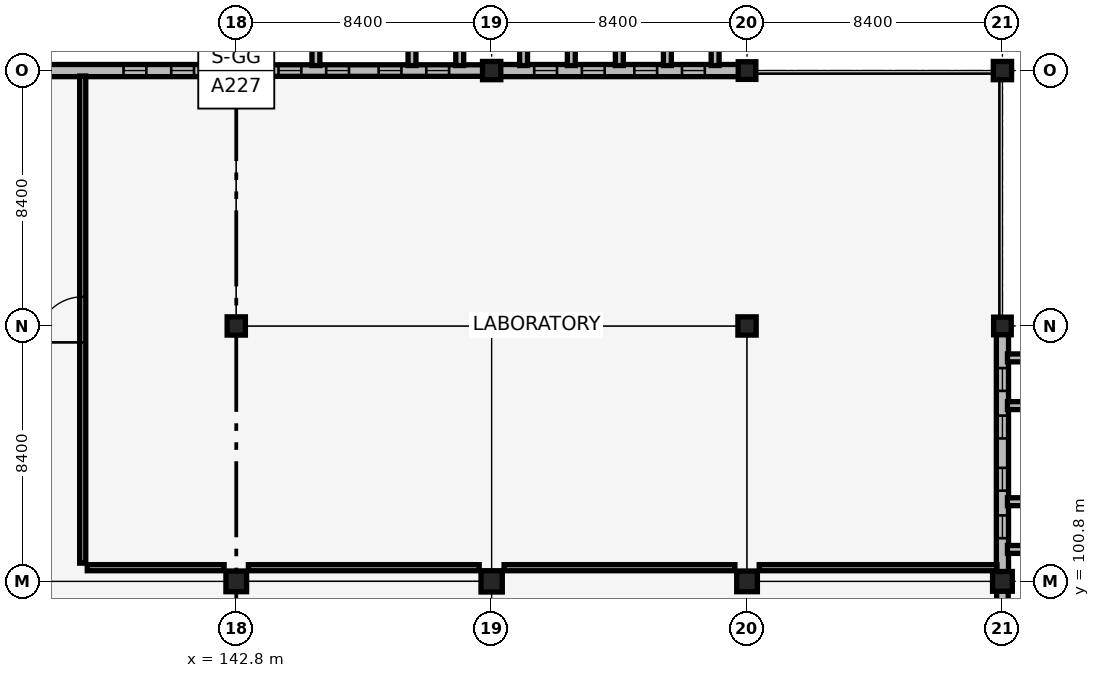
"""IFC4 building model, lengths in metres.
Left out: names, types, materials, properties, quantities, classifications, styles, units other than length and angle.
Written with IfcOpenShell. Run it as: python <this file> out.ifc"""

import sys

from ifc_helpers import new_model, si_unit, direction, frame, frame_2d, origin, origin_2d, place, context, subcontext, project, spatial, rectangle, extrude, element, fill, save


model = new_model("IFC4")
c1 = context("Model", 3, precision=1e-05, world=origin(), true_north=direction((0.0, 1.0)))
c2 = subcontext(c1, "Body", "Model", "MODEL_VIEW")
j1 = project(units=[si_unit("LENGTHUNIT", "METRE"), si_unit("PLANEANGLEUNIT", "RADIAN")], contexts=[c1])
p1 = place(None, origin())
s1 = spatial("IfcSite", under=j1, at=p1, CompositionType="ELEMENT")
p2 = place(p1, origin())
s2 = spatial("IfcBuilding", under=s1, at=p2, CompositionType="ELEMENT")
p3 = place(p2, frame((0.0, 0.0, 9.86)))
s3 = spatial("IfcBuildingStorey", under=s2, at=p3, CompositionType="ELEMENT", Elevation=9.86)
p4 = place(p3, frame((142.8, 100.8, 0.0), z_axis=(0.0, 0.0, 1.0), x_axis=(1.0, 0.0, 0.0)))
e1 = element("IfcColumn", 1, at=p4, inside=s3, PredefinedType="COLUMN", context=c2, shape_type="SweptSolid", body=[
    extrude(rectangle(XDim=0.68, YDim=0.68, at=origin_2d()), origin(), (0.0, 0.0, 1.0), 3.78),
])
p5 = place(p3, frame((142.8, 109.2, 0.0), z_axis=(0.0, 0.0, 1.0), x_axis=(1.0, 0.0, 0.0)))
e2 = element("IfcColumn", 2, at=p5, inside=s3, PredefinedType="COLUMN", context=c2, shape_type="SweptSolid", body=[
    extrude(rectangle(XDim=0.6, YDim=0.6, at=origin_2d()), origin(), (0.0, 0.0, 1.0), 3.78),
])
p6 = place(p3, frame((142.8, 117.6, 0.0), z_axis=(0.0, 0.0, 1.0), x_axis=(1.0, 0.0, 0.0)))
e3 = element("IfcColumn", 3, at=p6, inside=s3, PredefinedType="COLUMN", context=c2, shape_type="SweptSolid", body=[
    extrude(rectangle(XDim=0.58, YDim=0.58, at=origin_2d()), origin(), (0.0, 0.0, 1.0), 3.78),
])
p7 = place(p3, frame((151.2, 100.8, 0.0), z_axis=(0.0, 0.0, 1.0), x_axis=(1.0, 0.0, 0.0)))
e4 = element("IfcColumn", 4, at=p7, inside=s3, PredefinedType="COLUMN", context=c2, shape_type="SweptSolid", body=[
    extrude(rectangle(XDim=0.7, YDim=0.7, at=origin_2d()), origin(), (0.0, 0.0, 1.0), 3.78),
])
p8 = place(p3, frame((151.2, 109.2, 0.0), z_axis=(0.0, 0.0, 1.0), x_axis=(1.0, 0.0, 0.0)))
e5 = element("IfcColumn", 5, at=p8, inside=s3, PredefinedType="COLUMN", context=c2, shape_type="SweptSolid", body=[
    extrude(rectangle(XDim=0.58, YDim=0.58, at=origin_2d()), origin(), (0.0, 0.0, 1.0), 3.78),
])
p9 = place(p3, frame((151.2, 117.6, 0.0), z_axis=(0.0, 0.0, 1.0), x_axis=(1.0, 0.0, 0.0)))
e6 = element("IfcColumn", 6, at=p9, inside=s3, PredefinedType="COLUMN", context=c2, shape_type="SweptSolid", body=[
    extrude(rectangle(XDim=0.6, YDim=0.6, at=origin_2d()), origin(), (0.0, 0.0, 1.0), 3.78),
])
p10 = place(p3, frame((159.6, 100.8, 0.0), z_axis=(0.0, 0.0, 1.0), x_axis=(1.0, 0.0, 0.0)))
e7 = element("IfcColumn", 7, at=p10, inside=s3, PredefinedType="COLUMN", context=c2, shape_type="SweptSolid", body=[
    extrude(rectangle(XDim=0.68, YDim=0.68, at=origin_2d()), origin(), (0.0, 0.0, 1.0), 3.78),
])
p11 = place(p3, frame((159.6, 109.2, 0.0), z_axis=(0.0, 0.0, 1.0), x_axis=(1.0, 0.0, 0.0)))
e8 = element("IfcColumn", 8, at=p11, inside=s3, PredefinedType="COLUMN", context=c2, shape_type="SweptSolid", body=[
    extrude(rectangle(XDim=0.6, YDim=0.6, at=origin_2d()), origin(), (0.0, 0.0, 1.0), 3.78),
])
p12 = place(p3, frame((159.6, 117.6, 0.0), z_axis=(0.0, 0.0, 1.0), x_axis=(1.0, 0.0, 0.0)))
e9 = element("IfcColumn", 9, at=p12, inside=s3, PredefinedType="COLUMN", context=c2, shape_type="SweptSolid", body=[
    extrude(rectangle(XDim=0.58, YDim=0.58, at=origin_2d()), origin(), (0.0, 0.0, 1.0), 3.78),
])
p13 = place(p3, frame((168.0, 100.8, 0.0), z_axis=(0.0, 0.0, 1.0), x_axis=(1.0, 0.0, 0.0)))
e10 = element("IfcColumn", 10, at=p13, inside=s3, PredefinedType="COLUMN", context=c2, shape_type="SweptSolid", body=[
    extrude(rectangle(XDim=0.65, YDim=0.65, at=origin_2d()), origin(), (0.0, 0.0, 1.0), 3.78),
])
p14 = place(p3, frame((168.0, 109.2, 0.0), z_axis=(0.0, 0.0, 1.0), x_axis=(1.0, 0.0, 0.0)))
e11 = element("IfcColumn", 11, at=p14, inside=s3, PredefinedType="COLUMN", context=c2, shape_type="SweptSolid", body=[
    extrude(rectangle(XDim=0.58, YDim=0.58, at=origin_2d()), origin(), (0.0, 0.0, 1.0), 3.78),
])
p15 = place(p3, frame((168.0, 117.6, 0.0), z_axis=(0.0, 0.0, 1.0), x_axis=(1.0, 0.0, 0.0)))
e12 = element("IfcColumn", 12, at=p15, inside=s3, PredefinedType="COLUMN", context=c2, shape_type="SweptSolid", body=[
    extrude(rectangle(XDim=0.6, YDim=0.6, at=origin_2d()), origin(), (0.0, 0.0, 1.0), 3.78),
])
p16 = place(p3, frame((134.685, 117.6, 0.0), z_axis=(0.0, 0.0, 1.0), x_axis=(1.0, 0.0, 0.0)))
e13 = element("IfcWall", 13, at=p16, inside=s3, PredefinedType="SOLIDWALL", context=c2, shape_type="SweptSolid", body=[
    extrude(rectangle(XDim=7.84, YDim=0.4, at=frame_2d((3.92, 0.0))), origin(), (0.0, 0.0, 1.0), 3.01),
])
p17 = place(p16, frame((1.115, 0.0, 0.7)))
e14 = element("IfcOpeningElement", 14, at=p17, cuts=e13, PredefinedType="OPENING", context=c2, shape_type="SweptSolid", body=[
    extrude(rectangle(XDim=0.75, YDim=2.1, at=frame_2d((0.375, 1.05))), frame((0.0, 0.21, 0.0), z_axis=(0.0, -1.0, 0.0), x_axis=(1.0, 0.0, 0.0)), (0.0, 0.0, 1.0), 0.42),
])
p18 = place(p16, frame((4.407, 0.0, 0.7)))
e15 = element("IfcOpeningElement", 15, at=p18, cuts=e13, PredefinedType="OPENING", context=c2, shape_type="SweptSolid", body=[
    extrude(rectangle(XDim=0.75, YDim=2.1, at=frame_2d((0.375, 1.05))), frame((0.0, 0.21, 0.0), z_axis=(0.0, -1.0, 0.0), x_axis=(1.0, 0.0, 0.0)), (0.0, 0.0, 1.0), 0.42),
])
p19 = place(p16, frame((5.975, 0.0, 0.7)))
e16 = element("IfcOpeningElement", 16, at=p19, cuts=e13, PredefinedType="OPENING", context=c2, shape_type="SweptSolid", body=[
    extrude(rectangle(XDim=0.75, YDim=2.1, at=frame_2d((0.375, 1.05))), frame((0.0, 0.21, 0.0), z_axis=(0.0, -1.0, 0.0), x_axis=(1.0, 0.0, 0.0)), (0.0, 0.0, 1.0), 0.42),
])
p20 = place(p3, frame((143.075, 117.6, 0.0), z_axis=(0.0, 0.0, 1.0), x_axis=(1.0, 0.0, 0.0)))
e17 = element("IfcWall", 17, at=p20, inside=s3, PredefinedType="SOLIDWALL", context=c2, shape_type="SweptSolid", body=[
    extrude(rectangle(XDim=7.84, YDim=0.38, at=frame_2d((3.92, 0.0))), origin(), (0.0, 0.0, 1.0), 3.01),
])
p21 = place(p20, frame((1.115, 0.0, 0.7)))
e18 = element("IfcOpeningElement", 18, at=p21, cuts=e17, PredefinedType="OPENING", context=c2, shape_type="SweptSolid", body=[
    extrude(rectangle(XDim=0.75, YDim=2.1, at=frame_2d((0.375, 1.05))), frame((0.0, 0.2, 0.0), z_axis=(0.0, -1.0, 0.0), x_axis=(1.0, 0.0, 0.0)), (0.0, 0.0, 1.0), 0.4),
])
p22 = place(p20, frame((2.683, 0.0, 0.7)))
e19 = element("IfcOpeningElement", 19, at=p22, cuts=e17, PredefinedType="OPENING", context=c2, shape_type="SweptSolid", body=[
    extrude(rectangle(XDim=0.75, YDim=2.1, at=frame_2d((0.375, 1.05))), frame((0.0, 0.2, 0.0), z_axis=(0.0, -1.0, 0.0), x_axis=(1.0, 0.0, 0.0)), (0.0, 0.0, 1.0), 0.4),
])
p23 = place(p20, frame((4.407, 0.0, 0.7)))
e20 = element("IfcOpeningElement", 20, at=p23, cuts=e17, PredefinedType="OPENING", context=c2, shape_type="SweptSolid", body=[
    extrude(rectangle(XDim=0.75, YDim=2.1, at=frame_2d((0.375, 1.05))), frame((0.0, 0.2, 0.0), z_axis=(0.0, -1.0, 0.0), x_axis=(1.0, 0.0, 0.0)), (0.0, 0.0, 1.0), 0.4),
])
p24 = place(p20, frame((5.975, 0.0, 0.7)))
e21 = element("IfcOpeningElement", 21, at=p24, cuts=e17, PredefinedType="OPENING", context=c2, shape_type="SweptSolid", body=[
    extrude(rectangle(XDim=0.75, YDim=2.1, at=frame_2d((0.375, 1.05))), frame((0.0, 0.2, 0.0), z_axis=(0.0, -1.0, 0.0), x_axis=(1.0, 0.0, 0.0)), (0.0, 0.0, 1.0), 0.4),
])
for number, where, z_axis, x_axis in (
    (22, (143.85, 117.765, 0.0), (0.0, 0.0, 1.0), (0.0, 1.0, 0.0)),
    (23, (145.42, 117.765, 0.0), (0.0, 0.0, 1.0), (0.0, 1.0, 0.0)),
    (24, (148.58, 117.765, 0.0), (0.0, 0.0, 1.0), (0.0, 1.0, 0.0)),
    (25, (150.15, 117.765, 0.0), (0.0, 0.0, 1.0), (0.0, 1.0, 0.0)),
):
    element("IfcWall", number, at=place(p3, frame(where, z_axis=z_axis, x_axis=x_axis)), inside=s3, PredefinedType="SOLIDWALL", context=c2, shape_type="SweptSolid", body=[
        extrude(rectangle(XDim=0.7, YDim=0.26, at=frame_2d((0.35, 0.0))), origin(), (0.0, 0.0, 1.0), 4.08),
    ])
p25 = place(p3, frame((151.485, 117.6, 0.0), z_axis=(0.0, 0.0, 1.0), x_axis=(1.0, 0.0, 0.0)))
e26 = element("IfcWall", 26, at=p25, inside=s3, PredefinedType="SOLIDWALL", context=c2, shape_type="SweptSolid", body=[
    extrude(rectangle(XDim=7.84, YDim=0.4, at=frame_2d((3.92, 0.0))), origin(), (0.0, 0.0, 1.0), 3.01),
])
p26 = place(p25, frame((1.115, 0.0, 0.7)))
e27 = element("IfcOpeningElement", 27, at=p26, cuts=e26, PredefinedType="OPENING", context=c2, shape_type="SweptSolid", body=[
    extrude(rectangle(XDim=0.75, YDim=2.1, at=frame_2d((0.375, 1.05))), frame((0.0, 0.21, 0.0), z_axis=(0.0, -1.0, 0.0), x_axis=(1.0, 0.0, 0.0)), (0.0, 0.0, 1.0), 0.42),
])
p27 = place(p25, frame((2.683, 0.0, 0.7)))
e28 = element("IfcOpeningElement", 28, at=p27, cuts=e26, PredefinedType="OPENING", context=c2, shape_type="SweptSolid", body=[
    extrude(rectangle(XDim=0.75, YDim=2.1, at=frame_2d((0.375, 1.05))), frame((0.0, 0.21, 0.0), z_axis=(0.0, -1.0, 0.0), x_axis=(1.0, 0.0, 0.0)), (0.0, 0.0, 1.0), 0.42),
])
p28 = place(p25, frame((4.407, 0.0, 0.7)))
e29 = element("IfcOpeningElement", 29, at=p28, cuts=e26, PredefinedType="OPENING", context=c2, shape_type="SweptSolid", body=[
    extrude(rectangle(XDim=0.75, YDim=2.1, at=frame_2d((0.375, 1.05))), frame((0.0, 0.21, 0.0), z_axis=(0.0, -1.0, 0.0), x_axis=(1.0, 0.0, 0.0)), (0.0, 0.0, 1.0), 0.42),
])
p29 = place(p25, frame((5.975, 0.0, 0.7)))
e30 = element("IfcOpeningElement", 30, at=p29, cuts=e26, PredefinedType="OPENING", context=c2, shape_type="SweptSolid", body=[
    extrude(rectangle(XDim=0.75, YDim=2.1, at=frame_2d((0.375, 1.05))), frame((0.0, 0.21, 0.0), z_axis=(0.0, -1.0, 0.0), x_axis=(1.0, 0.0, 0.0)), (0.0, 0.0, 1.0), 0.42),
])
for number, where, z_axis, x_axis in (
    (31, (152.25, 117.765, 0.0), (0.0, 0.0, 1.0), (0.0, 1.0, 0.0)),
    (32, (153.82, 117.765, 0.0), (0.0, 0.0, 1.0), (0.0, 1.0, 0.0)),
    (33, (155.4, 117.765, 0.0), (0.0, 0.0, 1.0), (0.0, 1.0, 0.0)),
    (34, (156.98, 117.765, 0.0), (0.0, 0.0, 1.0), (0.0, 1.0, 0.0)),
    (35, (158.55, 117.765, 0.0), (0.0, 0.0, 1.0), (0.0, 1.0, 0.0)),
):
    element("IfcWall", number, at=place(p3, frame(where, z_axis=z_axis, x_axis=x_axis)), inside=s3, PredefinedType="SOLIDWALL", context=c2, shape_type="SweptSolid", body=[
        extrude(rectangle(XDim=0.7, YDim=0.26, at=frame_2d((0.35, 0.0))), origin(), (0.0, 0.0, 1.0), 4.08),
    ])
p30 = place(p3, frame((168.0, 92.695, 0.0), z_axis=(0.0, 0.0, 1.0), x_axis=(0.0, 1.0, 0.0)))
e36 = element("IfcWall", 36, at=p30, inside=s3, PredefinedType="SOLIDWALL", context=c2, shape_type="SweptSolid", body=[
    extrude(rectangle(XDim=7.795, YDim=0.38, at=frame_2d((3.897, 0.0))), origin(), (0.0, 0.0, 1.0), 3.0),
])
p31 = place(p30, frame((1.106, 0.0, 0.7)))
e37 = element("IfcOpeningElement", 37, at=p31, cuts=e36, PredefinedType="OPENING", context=c2, shape_type="SweptSolid", body=[
    extrude(rectangle(XDim=0.75, YDim=2.1, at=frame_2d((0.375, 1.05))), frame((0.0, 0.2, 0.0), z_axis=(0.0, -1.0, 0.0), x_axis=(1.0, 0.0, 0.0)), (0.0, 0.0, 1.0), 0.4),
])
p32 = place(p30, frame((2.665, 0.0, 0.7)))
e38 = element("IfcOpeningElement", 38, at=p32, cuts=e36, PredefinedType="OPENING", context=c2, shape_type="SweptSolid", body=[
    extrude(rectangle(XDim=0.75, YDim=2.1, at=frame_2d((0.375, 1.05))), frame((0.0, 0.2, 0.0), z_axis=(0.0, -1.0, 0.0), x_axis=(1.0, 0.0, 0.0)), (0.0, 0.0, 1.0), 0.4),
])
p33 = place(p30, frame((4.38, 0.0, 0.7)))
e39 = element("IfcOpeningElement", 39, at=p33, cuts=e36, PredefinedType="OPENING", context=c2, shape_type="SweptSolid", body=[
    extrude(rectangle(XDim=0.75, YDim=2.1, at=frame_2d((0.375, 1.05))), frame((0.0, 0.2, 0.0), z_axis=(0.0, -1.0, 0.0), x_axis=(1.0, 0.0, 0.0)), (0.0, 0.0, 1.0), 0.4),
])
p34 = place(p30, frame((5.939, 0.0, 0.7)))
e40 = element("IfcOpeningElement", 40, at=p34, cuts=e36, PredefinedType="OPENING", context=c2, shape_type="SweptSolid", body=[
    extrude(rectangle(XDim=0.75, YDim=2.1, at=frame_2d((0.375, 1.05))), frame((0.0, 0.2, 0.0), z_axis=(0.0, -1.0, 0.0), x_axis=(1.0, 0.0, 0.0)), (0.0, 0.0, 1.0), 0.4),
])
p35 = place(p3, frame((168.0, 101.11, 0.0), z_axis=(0.0, 0.0, 1.0), x_axis=(0.0, 1.0, 0.0)))
e41 = element("IfcWall", 41, at=p35, inside=s3, PredefinedType="SOLIDWALL", context=c2, shape_type="SweptSolid", body=[
    extrude(rectangle(XDim=7.815, YDim=0.4, at=frame_2d((3.907, 0.0))), origin(), (0.0, 0.0, 1.0), 3.0),
])
p36 = place(p35, frame((1.11, 0.0, 0.7)))
e42 = element("IfcOpeningElement", 42, at=p36, cuts=e41, PredefinedType="OPENING", context=c2, shape_type="SweptSolid", body=[
    extrude(rectangle(XDim=0.75, YDim=2.1, at=frame_2d((0.375, 1.05))), frame((0.0, 0.21, 0.0), z_axis=(0.0, -1.0, 0.0), x_axis=(1.0, 0.0, 0.0)), (0.0, 0.0, 1.0), 0.42),
])
p37 = place(p35, frame((2.673, 0.0, 0.7)))
e43 = element("IfcOpeningElement", 43, at=p37, cuts=e41, PredefinedType="OPENING", context=c2, shape_type="SweptSolid", body=[
    extrude(rectangle(XDim=0.75, YDim=2.1, at=frame_2d((0.375, 1.05))), frame((0.0, 0.21, 0.0), z_axis=(0.0, -1.0, 0.0), x_axis=(1.0, 0.0, 0.0)), (0.0, 0.0, 1.0), 0.42),
])
p38 = place(p35, frame((4.392, 0.0, 0.7)))
e44 = element("IfcOpeningElement", 44, at=p38, cuts=e41, PredefinedType="OPENING", context=c2, shape_type="SweptSolid", body=[
    extrude(rectangle(XDim=0.75, YDim=2.1, at=frame_2d((0.375, 1.05))), frame((0.0, 0.21, 0.0), z_axis=(0.0, -1.0, 0.0), x_axis=(1.0, 0.0, 0.0)), (0.0, 0.0, 1.0), 0.42),
])
p39 = place(p35, frame((5.955, 0.0, 0.7)))
e45 = element("IfcOpeningElement", 45, at=p39, cuts=e41, PredefinedType="OPENING", context=c2, shape_type="SweptSolid", body=[
    extrude(rectangle(XDim=0.75, YDim=2.1, at=frame_2d((0.375, 1.05))), frame((0.0, 0.21, 0.0), z_axis=(0.0, -1.0, 0.0), x_axis=(1.0, 0.0, 0.0)), (0.0, 0.0, 1.0), 0.42),
])
for number, where, z_axis, x_axis in (
    (46, (168.165, 101.85, 0.0), (0.0, 0.0, 1.0), (1.0, 0.0, 0.0)),
    (47, (168.165, 103.42, 0.0), (0.0, 0.0, 1.0), (1.0, 0.0, 0.0)),
    (48, (168.165, 106.58, 0.0), (0.0, 0.0, 1.0), (1.0, 0.0, 0.0)),
    (49, (168.165, 108.15, 0.0), (0.0, 0.0, 1.0), (1.0, 0.0, 0.0)),
):
    element("IfcWall", number, at=place(p3, frame(where, z_axis=z_axis, x_axis=x_axis)), inside=s3, PredefinedType="SOLIDWALL", context=c2, shape_type="SweptSolid", body=[
        extrude(rectangle(XDim=0.7, YDim=0.26, at=frame_2d((0.35, 0.0))), origin(), (0.0, 0.0, 1.0), 4.08),
    ])
p40 = place(p3, frame((137.75, 101.4, 0.0), z_axis=(0.0, 0.0, 1.0), x_axis=(0.0, 1.0, 0.0)))
e50 = element("IfcWall", 50, at=p40, inside=s3, PredefinedType="PARTITIONING", context=c2, shape_type="SweptSolid", body=[
    extrude(rectangle(XDim=16.02, YDim=0.2, at=frame_2d((8.01, 0.0))), origin(), (0.0, 0.0, 1.0), 2.95),
])
p41 = place(p40, frame((7.26, 0.0, 0.0)))
e51 = element("IfcOpeningElement", 51, at=p41, cuts=e50, PredefinedType="OPENING", context=c2, shape_type="SweptSolid", body=[
    extrude(rectangle(XDim=1.5, YDim=2.2, at=frame_2d((0.75, 1.1))), frame((0.0, 0.11, 0.0), z_axis=(0.0, -1.0, 0.0), x_axis=(1.0, 0.0, 0.0)), (0.0, 0.0, 1.0), 0.22),
])
p42 = place(p3, frame((137.9, 101.25, 0.0), z_axis=(0.0, 0.0, 1.0), x_axis=(1.0, 0.0, 0.0)))
e52 = element("IfcWall", 52, at=p42, inside=s3, PredefinedType="PARTITIONING", context=c2, shape_type="SweptSolid", body=[
    extrude(rectangle(XDim=4.5, YDim=0.2, at=frame_2d((2.25, 0.0))), origin(), (0.0, 0.0, 1.0), 3.78),
])
p43 = place(p3, frame((143.2, 101.25, 0.0), z_axis=(0.0, 0.0, 1.0), x_axis=(1.0, 0.0, 0.0)))
e53 = element("IfcWall", 53, at=p43, inside=s3, PredefinedType="PARTITIONING", context=c2, shape_type="SweptSolid", body=[
    extrude(rectangle(XDim=7.59, YDim=0.2, at=frame_2d((3.795, 0.0))), origin(), (0.0, 0.0, 1.0), 3.78),
])
p44 = place(p3, frame((151.61, 101.25, 0.0), z_axis=(0.0, 0.0, 1.0), x_axis=(1.0, 0.0, 0.0)))
e54 = element("IfcWall", 54, at=p44, inside=s3, PredefinedType="PARTITIONING", context=c2, shape_type="SweptSolid", body=[
    extrude(rectangle(XDim=7.59, YDim=0.2, at=frame_2d((3.795, 0.0))), origin(), (0.0, 0.0, 1.0), 3.78),
])
p45 = place(p3, frame((160.0, 101.25, 0.0), z_axis=(0.0, 0.0, 1.0), x_axis=(1.0, 0.0, 0.0)))
e55 = element("IfcWall", 55, at=p45, inside=s3, PredefinedType="PARTITIONING", context=c2, shape_type="SweptSolid", body=[
    extrude(rectangle(XDim=7.82, YDim=0.2, at=frame_2d((3.91, 0.0))), origin(), (0.0, 0.0, 1.0), 3.0),
])
p46 = place(p18, origin())
e56 = element("IfcWindow", 56, at=p46, inside=s3, PartitioningType="DOUBLE_PANEL_VERTICAL", PredefinedType="WINDOW", context=c2, shape_type="SweptSolid", body=[
    extrude(rectangle(XDim=0.75, YDim=2.1, at=frame_2d((0.375, 1.05))), frame((0.0, 0.03, 0.0), z_axis=(0.0, -1.0, 0.0), x_axis=(1.0, 0.0, 0.0)), (0.0, 0.0, 1.0), 0.06),
])
fill(e15, e56)
p47 = place(p19, origin())
e57 = element("IfcWindow", 57, at=p47, inside=s3, PartitioningType="DOUBLE_PANEL_VERTICAL", PredefinedType="WINDOW", context=c2, shape_type="SweptSolid", body=[
    extrude(rectangle(XDim=0.75, YDim=2.1, at=frame_2d((0.375, 1.05))), frame((0.0, 0.03, 0.0), z_axis=(0.0, -1.0, 0.0), x_axis=(1.0, 0.0, 0.0)), (0.0, 0.0, 1.0), 0.06),
])
fill(e16, e57)
p48 = place(p21, origin())
e58 = element("IfcWindow", 58, at=p48, inside=s3, PartitioningType="DOUBLE_PANEL_VERTICAL", PredefinedType="WINDOW", context=c2, shape_type="SweptSolid", body=[
    extrude(rectangle(XDim=0.75, YDim=2.1, at=frame_2d((0.375, 1.05))), frame((0.0, 0.03, 0.0), z_axis=(0.0, -1.0, 0.0), x_axis=(1.0, 0.0, 0.0)), (0.0, 0.0, 1.0), 0.06),
])
fill(e18, e58)
p49 = place(p22, origin())
e59 = element("IfcWindow", 59, at=p49, inside=s3, PartitioningType="DOUBLE_PANEL_VERTICAL", PredefinedType="WINDOW", context=c2, shape_type="SweptSolid", body=[
    extrude(rectangle(XDim=0.75, YDim=2.1, at=frame_2d((0.375, 1.05))), frame((0.0, 0.03, 0.0), z_axis=(0.0, -1.0, 0.0), x_axis=(1.0, 0.0, 0.0)), (0.0, 0.0, 1.0), 0.06),
])
fill(e19, e59)
p50 = place(p23, origin())
e60 = element("IfcWindow", 60, at=p50, inside=s3, PartitioningType="DOUBLE_PANEL_VERTICAL", PredefinedType="WINDOW", context=c2, shape_type="SweptSolid", body=[
    extrude(rectangle(XDim=0.75, YDim=2.1, at=frame_2d((0.375, 1.05))), frame((0.0, 0.03, 0.0), z_axis=(0.0, -1.0, 0.0), x_axis=(1.0, 0.0, 0.0)), (0.0, 0.0, 1.0), 0.06),
])
fill(e20, e60)
p51 = place(p24, origin())
e61 = element("IfcWindow", 61, at=p51, inside=s3, PartitioningType="DOUBLE_PANEL_VERTICAL", PredefinedType="WINDOW", context=c2, shape_type="SweptSolid", body=[
    extrude(rectangle(XDim=0.75, YDim=2.1, at=frame_2d((0.375, 1.05))), frame((0.0, 0.03, 0.0), z_axis=(0.0, -1.0, 0.0), x_axis=(1.0, 0.0, 0.0)), (0.0, 0.0, 1.0), 0.06),
])
fill(e21, e61)
p52 = place(p26, origin())
e62 = element("IfcWindow", 62, at=p52, inside=s3, PartitioningType="DOUBLE_PANEL_VERTICAL", PredefinedType="WINDOW", context=c2, shape_type="SweptSolid", body=[
    extrude(rectangle(XDim=0.75, YDim=2.1, at=frame_2d((0.375, 1.05))), frame((0.0, 0.03, 0.0), z_axis=(0.0, -1.0, 0.0), x_axis=(1.0, 0.0, 0.0)), (0.0, 0.0, 1.0), 0.06),
])
fill(e27, e62)
p53 = place(p27, origin())
e63 = element("IfcWindow", 63, at=p53, inside=s3, PartitioningType="DOUBLE_PANEL_VERTICAL", PredefinedType="WINDOW", context=c2, shape_type="SweptSolid", body=[
    extrude(rectangle(XDim=0.75, YDim=2.1, at=frame_2d((0.375, 1.05))), frame((0.0, 0.03, 0.0), z_axis=(0.0, -1.0, 0.0), x_axis=(1.0, 0.0, 0.0)), (0.0, 0.0, 1.0), 0.06),
])
fill(e28, e63)
p54 = place(p28, origin())
e64 = element("IfcWindow", 64, at=p54, inside=s3, PartitioningType="DOUBLE_PANEL_VERTICAL", PredefinedType="WINDOW", context=c2, shape_type="SweptSolid", body=[
    extrude(rectangle(XDim=0.75, YDim=2.1, at=frame_2d((0.375, 1.05))), frame((0.0, 0.03, 0.0), z_axis=(0.0, -1.0, 0.0), x_axis=(1.0, 0.0, 0.0)), (0.0, 0.0, 1.0), 0.06),
])
fill(e29, e64)
p55 = place(p29, origin())
e65 = element("IfcWindow", 65, at=p55, inside=s3, PartitioningType="DOUBLE_PANEL_VERTICAL", PredefinedType="WINDOW", context=c2, shape_type="SweptSolid", body=[
    extrude(rectangle(XDim=0.75, YDim=2.1, at=frame_2d((0.375, 1.05))), frame((0.0, 0.03, 0.0), z_axis=(0.0, -1.0, 0.0), x_axis=(1.0, 0.0, 0.0)), (0.0, 0.0, 1.0), 0.06),
])
fill(e30, e65)
p56 = place(p36, origin())
e66 = element("IfcWindow", 66, at=p56, inside=s3, PartitioningType="DOUBLE_PANEL_VERTICAL", PredefinedType="WINDOW", context=c2, shape_type="SweptSolid", body=[
    extrude(rectangle(XDim=0.75, YDim=2.1, at=frame_2d((0.375, 1.05))), frame((0.0, 0.03, 0.0), z_axis=(0.0, -1.0, 0.0), x_axis=(1.0, 0.0, 0.0)), (0.0, 0.0, 1.0), 0.06),
])
fill(e42, e66)
p57 = place(p37, origin())
e67 = element("IfcWindow", 67, at=p57, inside=s3, PartitioningType="DOUBLE_PANEL_VERTICAL", PredefinedType="WINDOW", context=c2, shape_type="SweptSolid", body=[
    extrude(rectangle(XDim=0.75, YDim=2.1, at=frame_2d((0.375, 1.05))), frame((0.0, 0.03, 0.0), z_axis=(0.0, -1.0, 0.0), x_axis=(1.0, 0.0, 0.0)), (0.0, 0.0, 1.0), 0.06),
])
fill(e43, e67)
p58 = place(p38, origin())
e68 = element("IfcWindow", 68, at=p58, inside=s3, PartitioningType="DOUBLE_PANEL_VERTICAL", PredefinedType="WINDOW", context=c2, shape_type="SweptSolid", body=[
    extrude(rectangle(XDim=0.75, YDim=2.1, at=frame_2d((0.375, 1.05))), frame((0.0, 0.03, 0.0), z_axis=(0.0, -1.0, 0.0), x_axis=(1.0, 0.0, 0.0)), (0.0, 0.0, 1.0), 0.06),
])
fill(e44, e68)
p59 = place(p39, origin())
e69 = element("IfcWindow", 69, at=p59, inside=s3, PartitioningType="DOUBLE_PANEL_VERTICAL", PredefinedType="WINDOW", context=c2, shape_type="SweptSolid", body=[
    extrude(rectangle(XDim=0.75, YDim=2.1, at=frame_2d((0.375, 1.05))), frame((0.0, 0.03, 0.0), z_axis=(0.0, -1.0, 0.0), x_axis=(1.0, 0.0, 0.0)), (0.0, 0.0, 1.0), 0.06),
])
fill(e45, e69)
p60 = place(p41, origin())
e70 = element("IfcDoor", 70, at=p60, inside=s3, OperationType="DOUBLE_DOOR_SINGLE_SWING", PredefinedType="DOOR", context=c2, shape_type="SweptSolid", body=[
    extrude(rectangle(XDim=1.5, YDim=2.2, at=frame_2d((0.75, 1.1))), frame((0.0, 0.025, 0.0), z_axis=(0.0, -1.0, 0.0), x_axis=(1.0, 0.0, 0.0)), (0.0, 0.0, 1.0), 0.05),
])
fill(e51, e70)
save(model, sys.argv[1])
